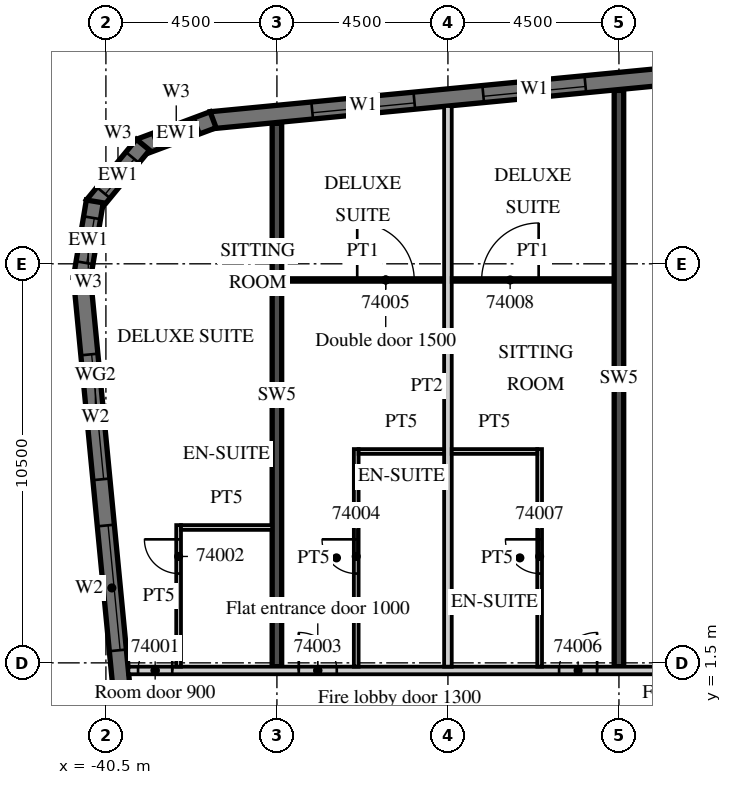
"""IFC4 building model, lengths in metres.
Left out: names, types, materials, properties, quantities, classifications, styles, units other than length and angle.
Written with IfcOpenShell. Run it as: python <this file> out.ifc"""

import sys

from ifc_helpers import new_model, si_unit, direction, frame, frame_2d, origin, place, context, subcontext, project, spatial, polyline, rectangle, outline, extrude, element, fill, save


model = new_model("IFC4")
c1 = context("Model", 3, precision=1e-05, world=origin(), true_north=direction((0.0, 1.0)))
c2 = subcontext(c1, "Body", "Model", "MODEL_VIEW")
j1 = project(units=[si_unit("LENGTHUNIT", "METRE"), si_unit("PLANEANGLEUNIT", "RADIAN")], contexts=[c1])
p1 = place(None, origin())
s1 = spatial("IfcSite", under=j1, at=p1, CompositionType="ELEMENT")
p2 = place(p1, origin())
s2 = spatial("IfcBuilding", under=s1, at=p2, CompositionType="ELEMENT")
p3 = place(p2, frame((0.0, 0.0, 294.9)))
s3 = spatial("IfcBuildingStorey", under=s2, at=p3, CompositionType="ELEMENT", Elevation=294.9)
p4 = place(p3, frame((-36.0, 1.4, 0.0), z_axis=(0.0, 0.0, 1.0), x_axis=(0.0, 1.0, 0.0)))
e1 = element("IfcWall", 1, at=p4, inside=s3, PredefinedType="SHEAR", context=c2, shape_type="SweptSolid", body=[
    extrude(rectangle(XDim=14.296, YDim=0.25, at=frame_2d((7.148, 0.0))), origin(), (0.0, 0.0, 1.0), 3.3),
])
p5 = place(p3, frame((-27.0, 1.4, 0.0), z_axis=(0.0, 0.0, 1.0), x_axis=(0.0, 1.0, 0.0)))
e2 = element("IfcWall", 2, at=p5, inside=s3, PredefinedType="SHEAR", context=c2, shape_type="SweptSolid", body=[
    extrude(rectangle(XDim=15.163, YDim=0.25, at=frame_2d((7.582, 0.0))), origin(), (0.0, 0.0, 1.0), 3.3),
])
p6 = place(p3, frame((-41.132, 11.658, 0.0), z_axis=(0.0, 0.0, 1.0), x_axis=(0.095847749461, -0.995396006082, 0.0)))
e3 = element("IfcWall", 3, at=p6, inside=s3, PredefinedType="SOLIDWALL", context=c2, shape_type="SweptSolid", body=[
    extrude(rectangle(XDim=32.0, YDim=0.45, at=frame_2d((16.0, 0.0))), origin(), (0.0, 0.0, 1.0), 3.02),
])
p7 = place(p6, frame((2.053, 0.0, 0.45)))
e4 = element("IfcOpeningElement", 4, at=p7, cuts=e3, PredefinedType="OPENING", context=c2, shape_type="SweptSolid", body=[
    extrude(rectangle(XDim=3.3, YDim=2.25, at=frame_2d((1.65, 1.125))), frame((0.0, 0.235, 0.0), z_axis=(0.0, -1.0, 0.0), x_axis=(1.0, 0.0, 0.0)), (0.0, 0.0, 1.0), 0.47),
])
p8 = place(p6, frame((6.574, 0.0, 0.45)))
e5 = element("IfcOpeningElement", 5, at=p8, cuts=e3, PredefinedType="OPENING", context=c2, shape_type="SweptSolid", body=[
    extrude(rectangle(XDim=3.3, YDim=2.25, at=frame_2d((1.65, 1.125))), frame((0.0, 0.235, 0.0), z_axis=(0.0, -1.0, 0.0), x_axis=(1.0, 0.0, 0.0)), (0.0, 0.0, 1.0), 0.47),
])
p9 = place(p3, frame((13.521, 20.713, 0.0), z_axis=(0.0, 0.0, 1.0), x_axis=(-0.995396277313, -0.095844932638, 0.0)))
e6 = element("IfcWall", 6, at=p9, inside=s3, PredefinedType="SOLIDWALL", context=c2, shape_type="SweptSolid", body=[
    extrude(rectangle(XDim=51.495, YDim=0.45, at=frame_2d((25.748, 0.0))), origin(), (0.0, 0.0, 1.0), 3.02),
])
p10 = place(p9, frame((0.91, 0.0, 0.45)))
e7 = element("IfcOpeningElement", 7, at=p10, cuts=e6, PredefinedType="OPENING", context=c2, shape_type="SweptSolid", body=[
    extrude(rectangle(XDim=2.7, YDim=2.25, at=frame_2d((1.35, 1.125))), frame((0.0, 0.235, 0.0), z_axis=(0.0, -1.0, 0.0), x_axis=(1.0, 0.0, 0.0)), (0.0, 0.0, 1.0), 0.47),
])
p11 = place(p9, frame((5.431, 0.0, 0.45)))
e8 = element("IfcOpeningElement", 8, at=p11, cuts=e6, PredefinedType="OPENING", context=c2, shape_type="SweptSolid", body=[
    extrude(rectangle(XDim=2.7, YDim=2.25, at=frame_2d((1.35, 1.125))), frame((0.0, 0.235, 0.0), z_axis=(0.0, -1.0, 0.0), x_axis=(1.0, 0.0, 0.0)), (0.0, 0.0, 1.0), 0.47),
])
p12 = place(p9, frame((9.952, 0.0, 0.45)))
e9 = element("IfcOpeningElement", 9, at=p12, cuts=e6, PredefinedType="OPENING", context=c2, shape_type="SweptSolid", body=[
    extrude(rectangle(XDim=2.7, YDim=2.25, at=frame_2d((1.35, 1.125))), frame((0.0, 0.235, 0.0), z_axis=(0.0, -1.0, 0.0), x_axis=(1.0, 0.0, 0.0)), (0.0, 0.0, 1.0), 0.47),
])
p13 = place(p9, frame((14.473, 0.0, 0.45)))
e10 = element("IfcOpeningElement", 10, at=p13, cuts=e6, PredefinedType="OPENING", context=c2, shape_type="SweptSolid", body=[
    extrude(rectangle(XDim=2.7, YDim=2.25, at=frame_2d((1.35, 1.125))), frame((0.0, 0.235, 0.0), z_axis=(0.0, -1.0, 0.0), x_axis=(1.0, 0.0, 0.0)), (0.0, 0.0, 1.0), 0.47),
])
p14 = place(p9, frame((18.994, 0.0, 0.45)))
e11 = element("IfcOpeningElement", 11, at=p14, cuts=e6, PredefinedType="OPENING", context=c2, shape_type="SweptSolid", body=[
    extrude(rectangle(XDim=2.7, YDim=2.25, at=frame_2d((1.35, 1.125))), frame((0.0, 0.235, 0.0), z_axis=(0.0, -1.0, 0.0), x_axis=(1.0, 0.0, 0.0)), (0.0, 0.0, 1.0), 0.47),
])
p15 = place(p9, frame((23.514, 0.0, 0.45)))
e12 = element("IfcOpeningElement", 12, at=p15, cuts=e6, PredefinedType="OPENING", context=c2, shape_type="SweptSolid", body=[
    extrude(rectangle(XDim=2.7, YDim=2.25, at=frame_2d((1.35, 1.125))), frame((0.0, 0.235, 0.0), z_axis=(0.0, -1.0, 0.0), x_axis=(1.0, 0.0, 0.0)), (0.0, 0.0, 1.0), 0.47),
])
p16 = place(p9, frame((28.035, 0.0, 0.45)))
e13 = element("IfcOpeningElement", 13, at=p16, cuts=e6, PredefinedType="OPENING", context=c2, shape_type="SweptSolid", body=[
    extrude(rectangle(XDim=2.7, YDim=2.25, at=frame_2d((1.35, 1.125))), frame((0.0, 0.235, 0.0), z_axis=(0.0, -1.0, 0.0), x_axis=(1.0, 0.0, 0.0)), (0.0, 0.0, 1.0), 0.47),
])
p17 = place(p9, frame((32.556, 0.0, 0.45)))
e14 = element("IfcOpeningElement", 14, at=p17, cuts=e6, PredefinedType="OPENING", context=c2, shape_type="SweptSolid", body=[
    extrude(rectangle(XDim=2.7, YDim=2.25, at=frame_2d((1.35, 1.125))), frame((0.0, 0.235, 0.0), z_axis=(0.0, -1.0, 0.0), x_axis=(1.0, 0.0, 0.0)), (0.0, 0.0, 1.0), 0.47),
])
p18 = place(p9, frame((37.077, 0.0, 0.45)))
e15 = element("IfcOpeningElement", 15, at=p18, cuts=e6, PredefinedType="OPENING", context=c2, shape_type="SweptSolid", body=[
    extrude(rectangle(XDim=2.7, YDim=2.25, at=frame_2d((1.35, 1.125))), frame((0.0, 0.235, 0.0), z_axis=(0.0, -1.0, 0.0), x_axis=(1.0, 0.0, 0.0)), (0.0, 0.0, 1.0), 0.47),
])
p19 = place(p9, frame((41.598, 0.0, 0.45)))
e16 = element("IfcOpeningElement", 16, at=p19, cuts=e6, PredefinedType="OPENING", context=c2, shape_type="SweptSolid", body=[
    extrude(rectangle(XDim=2.7, YDim=2.25, at=frame_2d((1.35, 1.125))), frame((0.0, 0.235, 0.0), z_axis=(0.0, -1.0, 0.0), x_axis=(1.0, 0.0, 0.0)), (0.0, 0.0, 1.0), 0.47),
])
p20 = place(p9, frame((46.118, 0.0, 0.45)))
e17 = element("IfcOpeningElement", 17, at=p20, cuts=e6, PredefinedType="OPENING", context=c2, shape_type="SweptSolid", body=[
    extrude(rectangle(XDim=2.7, YDim=2.25, at=frame_2d((1.35, 1.125))), frame((0.0, 0.235, 0.0), z_axis=(0.0, -1.0, 0.0), x_axis=(1.0, 0.0, 0.0)), (0.0, 0.0, 1.0), 0.47),
])
p21 = place(p3, frame((-37.679, 15.791, 0.0), z_axis=(0.0, 0.0, 1.0), x_axis=(-0.936677599948, -0.350192909346, 0.0)))
e18 = element("IfcWall", 18, at=p21, inside=s3, PredefinedType="SOLIDWALL", context=c2, shape_type="SweptSolid", body=[
    extrude(outline(polyline([(0.0, -0.225), (2.071, -0.225), (1.95, 0.225), (0.121, 0.225), (0.0, -0.225)])), origin(), (0.0, 0.0, 1.0), 3.02),
])
p22 = place(p21, frame((0.435, 0.0, 0.45)))
e19 = element("IfcOpeningElement", 19, at=p22, cuts=e18, PredefinedType="OPENING", context=c2, shape_type="SweptSolid", body=[
    extrude(rectangle(XDim=1.2, YDim=2.25, at=frame_2d((0.6, 1.125))), frame((0.0, 0.235, 0.0), z_axis=(0.0, -1.0, 0.0), x_axis=(1.0, 0.0, 0.0)), (0.0, 0.0, 1.0), 0.47),
])
p23 = place(p3, frame((-39.524, 15.133, 0.0), z_axis=(0.0, 0.0, 1.0), x_axis=(-0.636046112757, -0.771651049663, 0.0)))
e20 = element("IfcWall", 20, at=p23, inside=s3, PredefinedType="SOLIDWALL", context=c2, shape_type="SweptSolid", body=[
    extrude(outline(polyline([(0.0, -0.225), (2.071, -0.225), (1.95, 0.225), (0.121, 0.225), (0.0, -0.225)])), origin(), (0.0, 0.0, 1.0), 3.02),
])
p24 = place(p23, frame((0.435, 0.0, 0.45)))
e21 = element("IfcOpeningElement", 21, at=p24, cuts=e20, PredefinedType="OPENING", context=c2, shape_type="SweptSolid", body=[
    extrude(rectangle(XDim=1.2, YDim=2.25, at=frame_2d((0.6, 1.125))), frame((0.0, 0.235, 0.0), z_axis=(0.0, -1.0, 0.0), x_axis=(1.0, 0.0, 0.0)), (0.0, 0.0, 1.0), 0.47),
])
p25 = place(p3, frame((-40.792, 13.641, 0.0), z_axis=(0.0, 0.0, 1.0), x_axis=(-0.165068144653, -0.986282164302, 0.0)))
e22 = element("IfcWall", 22, at=p25, inside=s3, PredefinedType="SOLIDWALL", context=c2, shape_type="SweptSolid", body=[
    extrude(outline(polyline([(0.0, -0.225), (2.071, -0.225), (1.95, 0.225), (0.121, 0.225), (0.0, -0.225)])), origin(), (0.0, 0.0, 1.0), 3.02),
])
p26 = place(p25, frame((0.435, 0.0, 0.45)))
e23 = element("IfcOpeningElement", 23, at=p26, cuts=e22, PredefinedType="OPENING", context=c2, shape_type="SweptSolid", body=[
    extrude(rectangle(XDim=1.2, YDim=2.25, at=frame_2d((0.6, 1.125))), frame((0.0, 0.235, 0.0), z_axis=(0.0, -1.0, 0.0), x_axis=(1.0, 0.0, 0.0)), (0.0, 0.0, 1.0), 0.47),
])
p27 = place(p3, frame((-39.909, 1.3, 0.0), z_axis=(0.0, 0.0, 1.0), x_axis=(1.0, 0.0, 0.0)))
e24 = element("IfcWall", 24, at=p27, inside=s3, PredefinedType="PARTITIONING", context=c2, shape_type="SweptSolid", body=[
    extrude(rectangle(XDim=53.409, YDim=0.2, at=frame_2d((26.705, 0.0))), origin(), (0.0, 0.0, 1.0), 3.02),
])
p28 = place(p27, frame((0.255, 0.0, 0.0)))
e25 = element("IfcOpeningElement", 25, at=p28, cuts=e24, PredefinedType="OPENING", context=c2, shape_type="SweptSolid", body=[
    extrude(rectangle(XDim=0.9, YDim=2.1, at=frame_2d((0.45, 1.05))), frame((0.0, 0.11, 0.0), z_axis=(0.0, -1.0, 0.0), x_axis=(1.0, 0.0, 0.0)), (0.0, 0.0, 1.0), 0.22),
])
p29 = place(p27, frame((4.484, 0.0, 0.0)))
e26 = element("IfcOpeningElement", 26, at=p29, cuts=e24, PredefinedType="OPENING", context=c2, shape_type="SweptSolid", body=[
    extrude(rectangle(XDim=1.0, YDim=2.1, at=frame_2d((0.5, 1.05))), frame((0.0, 0.11, 0.0), z_axis=(0.0, -1.0, 0.0), x_axis=(1.0, 0.0, 0.0)), (0.0, 0.0, 1.0), 0.22),
])
p30 = place(p27, frame((11.334, 0.0, 0.0)))
e27 = element("IfcOpeningElement", 27, at=p30, cuts=e24, PredefinedType="OPENING", context=c2, shape_type="SweptSolid", body=[
    extrude(rectangle(XDim=1.0, YDim=2.1, at=frame_2d((0.5, 1.05))), frame((0.0, 0.11, 0.0), z_axis=(0.0, -1.0, 0.0), x_axis=(1.0, 0.0, 0.0)), (0.0, 0.0, 1.0), 0.22),
])
p31 = place(p27, frame((15.347, 0.0, 0.0)))
e28 = element("IfcOpeningElement", 28, at=p31, cuts=e24, PredefinedType="OPENING", context=c2, shape_type="SweptSolid", body=[
    extrude(rectangle(XDim=1.2, YDim=2.1, at=frame_2d((0.6, 1.05))), frame((0.0, 0.11, 0.0), z_axis=(0.0, -1.0, 0.0), x_axis=(1.0, 0.0, 0.0)), (0.0, 0.0, 1.0), 0.22),
])
p32 = place(p27, frame((24.859, 0.0, 0.0)))
e29 = element("IfcOpeningElement", 29, at=p32, cuts=e24, PredefinedType="OPENING", context=c2, shape_type="SweptSolid", body=[
    extrude(rectangle(XDim=1.0, YDim=2.1, at=frame_2d((0.5, 1.05))), frame((0.0, 0.11, 0.0), z_axis=(0.0, -1.0, 0.0), x_axis=(1.0, 0.0, 0.0)), (0.0, 0.0, 1.0), 0.22),
])
p33 = place(p27, frame((26.959, 0.0, 0.0)))
e30 = element("IfcOpeningElement", 30, at=p33, cuts=e24, PredefinedType="OPENING", context=c2, shape_type="SweptSolid", body=[
    extrude(rectangle(XDim=1.0, YDim=2.1, at=frame_2d((0.5, 1.05))), frame((0.0, 0.11, 0.0), z_axis=(0.0, -1.0, 0.0), x_axis=(1.0, 0.0, 0.0)), (0.0, 0.0, 1.0), 0.22),
])
p34 = place(p27, frame((33.346, 0.0, 0.0)))
e31 = element("IfcOpeningElement", 31, at=p34, cuts=e24, PredefinedType="OPENING", context=c2, shape_type="SweptSolid", body=[
    extrude(rectangle(XDim=1.2, YDim=2.1, at=frame_2d((0.6, 1.05))), frame((0.0, 0.11, 0.0), z_axis=(0.0, -1.0, 0.0), x_axis=(1.0, 0.0, 0.0)), (0.0, 0.0, 1.0), 0.22),
])
p35 = place(p27, frame((42.859, 0.0, 0.0)))
e32 = element("IfcOpeningElement", 32, at=p35, cuts=e24, PredefinedType="OPENING", context=c2, shape_type="SweptSolid", body=[
    extrude(rectangle(XDim=1.0, YDim=2.1, at=frame_2d((0.5, 1.05))), frame((0.0, 0.11, 0.0), z_axis=(0.0, -1.0, 0.0), x_axis=(1.0, 0.0, 0.0)), (0.0, 0.0, 1.0), 0.22),
])
p36 = place(p27, frame((44.959, 0.0, 0.0)))
e33 = element("IfcOpeningElement", 33, at=p36, cuts=e24, PredefinedType="OPENING", context=c2, shape_type="SweptSolid", body=[
    extrude(rectangle(XDim=1.0, YDim=2.1, at=frame_2d((0.5, 1.05))), frame((0.0, 0.11, 0.0), z_axis=(0.0, -1.0, 0.0), x_axis=(1.0, 0.0, 0.0)), (0.0, 0.0, 1.0), 0.22),
])
p37 = place(p27, frame((49.484, 0.0, 0.0)))
e34 = element("IfcOpeningElement", 34, at=p37, cuts=e24, PredefinedType="OPENING", context=c2, shape_type="SweptSolid", body=[
    extrude(rectangle(XDim=1.0, YDim=2.1, at=frame_2d((0.5, 1.05))), frame((0.0, 0.11, 0.0), z_axis=(0.0, -1.0, 0.0), x_axis=(1.0, 0.0, 0.0)), (0.0, 0.0, 1.0), 0.22),
])
p38 = place(p3, frame((-38.587, 1.4, 0.0), z_axis=(0.0, 0.0, 1.0), x_axis=(0.0, 1.0, 0.0)))
e35 = element("IfcWall", 35, at=p38, inside=s3, PredefinedType="PARTITIONING", context=c2, shape_type="SweptSolid", body=[
    extrude(rectangle(XDim=3.725, YDim=0.125, at=frame_2d((1.863, 0.0))), origin(), (0.0, 0.0, 1.0), 3.02),
])
p39 = place(p38, frame((2.45, 0.0, 0.0)))
e36 = element("IfcOpeningElement", 36, at=p39, cuts=e35, PredefinedType="OPENING", context=c2, shape_type="SweptSolid", body=[
    extrude(rectangle(XDim=0.9, YDim=2.1, at=frame_2d((0.45, 1.05))), frame((0.0, 0.073, 0.0), z_axis=(0.0, -1.0, 0.0), x_axis=(1.0, 0.0, 0.0)), (0.0, 0.0, 1.0), 0.145),
])
p40 = place(p3, frame((-38.525, 5.062, 0.0), z_axis=(0.0, 0.0, 1.0), x_axis=(1.0, 0.0, 0.0)))
e37 = element("IfcWall", 37, at=p40, inside=s3, PredefinedType="PARTITIONING", context=c2, shape_type="SweptSolid", body=[
    extrude(rectangle(XDim=2.4, YDim=0.125, at=frame_2d((1.2, 0.0))), origin(), (0.0, 0.0, 1.0), 3.02),
])
p41 = place(p3, frame((-31.5, 1.4, 0.0), z_axis=(0.0, 0.0, 1.0), x_axis=(0.0, 1.0, 0.0)))
e38 = element("IfcWall", 38, at=p41, inside=s3, PredefinedType="PARTITIONING", context=c2, shape_type="SweptSolid", body=[
    extrude(rectangle(XDim=14.752, YDim=0.2, at=frame_2d((7.376, 0.0))), origin(), (0.0, 0.0, 1.0), 3.02),
])
p42 = place(p3, frame((-33.913, 1.4, 0.0), z_axis=(0.0, 0.0, 1.0), x_axis=(0.0, 1.0, 0.0)))
e39 = element("IfcWall", 39, at=p42, inside=s3, PredefinedType="PARTITIONING", context=c2, shape_type="SweptSolid", body=[
    extrude(rectangle(XDim=5.725, YDim=0.125, at=frame_2d((2.863, 0.0))), origin(), (0.0, 0.0, 1.0), 3.02),
])
p43 = place(p42, frame((2.45, 0.0, 0.0)))
e40 = element("IfcOpeningElement", 40, at=p43, cuts=e39, PredefinedType="OPENING", context=c2, shape_type="SweptSolid", body=[
    extrude(rectangle(XDim=0.9, YDim=2.1, at=frame_2d((0.45, 1.05))), frame((0.0, 0.073, 0.0), z_axis=(0.0, -1.0, 0.0), x_axis=(1.0, 0.0, 0.0)), (0.0, 0.0, 1.0), 0.145),
])
p44 = place(p3, frame((-33.85, 7.062, 0.0), z_axis=(0.0, 0.0, 1.0), x_axis=(1.0, 0.0, 0.0)))
e41 = element("IfcWall", 41, at=p44, inside=s3, PredefinedType="PARTITIONING", context=c2, shape_type="SweptSolid", body=[
    extrude(rectangle(XDim=2.25, YDim=0.125, at=frame_2d((1.125, 0.0))), origin(), (0.0, 0.0, 1.0), 3.02),
])
p45 = place(p3, frame((-35.875, 11.575, 0.0), z_axis=(0.0, 0.0, 1.0), x_axis=(1.0, 0.0, 0.0)))
e42 = element("IfcWall", 42, at=p45, inside=s3, PredefinedType="PARTITIONING", context=c2, shape_type="SweptSolid", body=[
    extrude(rectangle(XDim=4.275, YDim=0.1, at=frame_2d((2.137, 0.0))), origin(), (0.0, 0.0, 1.0), 3.02),
])
p46 = place(p45, frame((1.988, 0.0, 0.0)))
e43 = element("IfcOpeningElement", 43, at=p46, cuts=e42, PredefinedType="OPENING", context=c2, shape_type="SweptSolid", body=[
    extrude(rectangle(XDim=1.5, YDim=2.1, at=frame_2d((0.75, 1.05))), frame((0.0, 0.06, 0.0), z_axis=(0.0, -1.0, 0.0), x_axis=(1.0, 0.0, 0.0)), (0.0, 0.0, 1.0), 0.12),
])
p47 = place(p3, frame((-29.087, 1.4, 0.0), z_axis=(0.0, 0.0, 1.0), x_axis=(0.0, 1.0, 0.0)))
e44 = element("IfcWall", 44, at=p47, inside=s3, PredefinedType="PARTITIONING", context=c2, shape_type="SweptSolid", body=[
    extrude(rectangle(XDim=5.725, YDim=0.125, at=frame_2d((2.863, 0.0))), origin(), (0.0, 0.0, 1.0), 3.02),
])
p48 = place(p47, frame((2.45, 0.0, 0.0)))
e45 = element("IfcOpeningElement", 45, at=p48, cuts=e44, PredefinedType="OPENING", context=c2, shape_type="SweptSolid", body=[
    extrude(rectangle(XDim=0.9, YDim=2.1, at=frame_2d((0.45, 1.05))), frame((0.0, 0.073, 0.0), z_axis=(0.0, -1.0, 0.0), x_axis=(1.0, 0.0, 0.0)), (0.0, 0.0, 1.0), 0.145),
])
p49 = place(p3, frame((-31.4, 7.062, 0.0), z_axis=(0.0, 0.0, 1.0), x_axis=(1.0, 0.0, 0.0)))
e46 = element("IfcWall", 46, at=p49, inside=s3, PredefinedType="PARTITIONING", context=c2, shape_type="SweptSolid", body=[
    extrude(rectangle(XDim=2.25, YDim=0.125, at=frame_2d((1.125, 0.0))), origin(), (0.0, 0.0, 1.0), 3.02),
])
p50 = place(p3, frame((-31.4, 11.575, 0.0), z_axis=(0.0, 0.0, 1.0), x_axis=(1.0, 0.0, 0.0)))
e47 = element("IfcWall", 47, at=p50, inside=s3, PredefinedType="PARTITIONING", context=c2, shape_type="SweptSolid", body=[
    extrude(rectangle(XDim=4.275, YDim=0.1, at=frame_2d((2.137, 0.0))), origin(), (0.0, 0.0, 1.0), 3.02),
])
p51 = place(p50, frame((0.787, 0.0, 0.0)))
e48 = element("IfcOpeningElement", 48, at=p51, cuts=e47, PredefinedType="OPENING", context=c2, shape_type="SweptSolid", body=[
    extrude(rectangle(XDim=1.5, YDim=2.1, at=frame_2d((0.75, 1.05))), frame((0.0, 0.06, 0.0), z_axis=(0.0, -1.0, 0.0), x_axis=(1.0, 0.0, 0.0)), (0.0, 0.0, 1.0), 0.12),
])
p52 = place(p7, origin())
e49 = element("IfcWindow", 49, at=p52, inside=s3, PartitioningType="SINGLE_PANEL", PredefinedType="WINDOW", context=c2, shape_type="SweptSolid", body=[
    extrude(rectangle(XDim=3.3, YDim=2.25, at=frame_2d((1.65, 1.125))), frame((0.0, 0.09, 0.0), z_axis=(0.0, -1.0, 0.0), x_axis=(1.0, 0.0, 0.0)), (0.0, 0.0, 1.0), 0.06),
])
fill(e4, e49)
p53 = place(p8, origin())
e50 = element("IfcWindow", 50, at=p53, inside=s3, PartitioningType="SINGLE_PANEL", PredefinedType="WINDOW", context=c2, shape_type="SweptSolid", body=[
    extrude(rectangle(XDim=3.3, YDim=2.25, at=frame_2d((1.65, 1.125))), frame((0.0, 0.09, 0.0), z_axis=(0.0, -1.0, 0.0), x_axis=(1.0, 0.0, 0.0)), (0.0, 0.0, 1.0), 0.06),
])
fill(e5, e50)
p54 = place(p19, origin())
e51 = element("IfcWindow", 51, at=p54, inside=s3, PartitioningType="SINGLE_PANEL", PredefinedType="WINDOW", context=c2, shape_type="SweptSolid", body=[
    extrude(rectangle(XDim=2.7, YDim=2.25, at=frame_2d((1.35, 1.125))), frame((0.0, 0.09, 0.0), z_axis=(0.0, -1.0, 0.0), x_axis=(1.0, 0.0, 0.0)), (0.0, 0.0, 1.0), 0.06),
])
fill(e16, e51)
p55 = place(p20, origin())
e52 = element("IfcWindow", 52, at=p55, inside=s3, PartitioningType="SINGLE_PANEL", PredefinedType="WINDOW", context=c2, shape_type="SweptSolid", body=[
    extrude(rectangle(XDim=2.7, YDim=2.25, at=frame_2d((1.35, 1.125))), frame((0.0, 0.09, 0.0), z_axis=(0.0, -1.0, 0.0), x_axis=(1.0, 0.0, 0.0)), (0.0, 0.0, 1.0), 0.06),
])
fill(e17, e52)
p56 = place(p22, origin())
e53 = element("IfcWindow", 53, at=p56, inside=s3, PartitioningType="SINGLE_PANEL", PredefinedType="WINDOW", context=c2, shape_type="SweptSolid", body=[
    extrude(rectangle(XDim=1.2, YDim=2.25, at=frame_2d((0.6, 1.125))), frame((0.0, 0.09, 0.0), z_axis=(0.0, -1.0, 0.0), x_axis=(1.0, 0.0, 0.0)), (0.0, 0.0, 1.0), 0.06),
])
fill(e19, e53)
p57 = place(p24, origin())
e54 = element("IfcWindow", 54, at=p57, inside=s3, PartitioningType="SINGLE_PANEL", PredefinedType="WINDOW", context=c2, shape_type="SweptSolid", body=[
    extrude(rectangle(XDim=1.2, YDim=2.25, at=frame_2d((0.6, 1.125))), frame((0.0, 0.09, 0.0), z_axis=(0.0, -1.0, 0.0), x_axis=(1.0, 0.0, 0.0)), (0.0, 0.0, 1.0), 0.06),
])
fill(e21, e54)
p58 = place(p26, origin())
e55 = element("IfcWindow", 55, at=p58, inside=s3, PartitioningType="SINGLE_PANEL", PredefinedType="WINDOW", context=c2, shape_type="SweptSolid", body=[
    extrude(rectangle(XDim=1.2, YDim=2.25, at=frame_2d((0.6, 1.125))), frame((0.0, 0.09, 0.0), z_axis=(0.0, -1.0, 0.0), x_axis=(1.0, 0.0, 0.0)), (0.0, 0.0, 1.0), 0.06),
])
fill(e23, e55)
p59 = place(p28, origin())
e56 = element("IfcDoor", 56, at=p59, inside=s3, OperationType="SINGLE_SWING_RIGHT", PredefinedType="DOOR", context=c2, shape_type="SweptSolid", body=[
    extrude(rectangle(XDim=0.9, YDim=2.1, at=frame_2d((0.45, 1.05))), frame((0.0, 0.025, 0.0), z_axis=(0.0, -1.0, 0.0), x_axis=(1.0, 0.0, 0.0)), (0.0, 0.0, 1.0), 0.05),
])
fill(e25, e56)
p60 = place(p39, origin())
e57 = element("IfcDoor", 57, at=p60, inside=s3, OperationType="SINGLE_SWING_RIGHT", PredefinedType="DOOR", context=c2, shape_type="SweptSolid", body=[
    extrude(rectangle(XDim=0.9, YDim=2.1, at=frame_2d((0.45, 1.05))), frame((0.0, 0.025, 0.0), z_axis=(0.0, -1.0, 0.0), x_axis=(1.0, 0.0, 0.0)), (0.0, 0.0, 1.0), 0.05),
])
fill(e36, e57)
p61 = place(p29, origin())
e58 = element("IfcDoor", 58, at=p61, inside=s3, OperationType="SINGLE_SWING_LEFT", PredefinedType="DOOR", context=c2, shape_type="SweptSolid", body=[
    extrude(rectangle(XDim=1.0, YDim=2.1, at=frame_2d((0.5, 1.05))), frame((0.0, 0.025, 0.0), z_axis=(0.0, -1.0, 0.0), x_axis=(1.0, 0.0, 0.0)), (0.0, 0.0, 1.0), 0.05),
])
fill(e26, e58)
p62 = place(p43, origin())
e59 = element("IfcDoor", 59, at=p62, inside=s3, OperationType="SINGLE_SWING_RIGHT", PredefinedType="DOOR", context=c2, shape_type="SweptSolid", body=[
    extrude(rectangle(XDim=0.9, YDim=2.1, at=frame_2d((0.45, 1.05))), frame((0.0, 0.025, 0.0), z_axis=(0.0, -1.0, 0.0), x_axis=(1.0, 0.0, 0.0)), (0.0, 0.0, 1.0), 0.05),
])
fill(e40, e59)
p63 = place(p46, origin())
e60 = element("IfcDoor", 60, at=p63, inside=s3, OperationType="SINGLE_SWING_LEFT", PredefinedType="DOOR", context=c2, shape_type="SweptSolid", body=[
    extrude(rectangle(XDim=1.5, YDim=2.1, at=frame_2d((0.75, 1.05))), frame((0.0, 0.025, 0.0), z_axis=(0.0, -1.0, 0.0), x_axis=(1.0, 0.0, 0.0)), (0.0, 0.0, 1.0), 0.05),
])
fill(e43, e60)
p64 = place(p30, origin())
e61 = element("IfcDoor", 61, at=p64, inside=s3, OperationType="SINGLE_SWING_RIGHT", PredefinedType="DOOR", context=c2, shape_type="SweptSolid", body=[
    extrude(rectangle(XDim=1.0, YDim=2.1, at=frame_2d((0.5, 1.05))), frame((0.0, 0.025, 0.0), z_axis=(0.0, -1.0, 0.0), x_axis=(1.0, 0.0, 0.0)), (0.0, 0.0, 1.0), 0.05),
])
fill(e27, e61)
p65 = place(p48, origin())
e62 = element("IfcDoor", 62, at=p65, inside=s3, OperationType="SINGLE_SWING_RIGHT", PredefinedType="DOOR", context=c2, shape_type="SweptSolid", body=[
    extrude(rectangle(XDim=0.9, YDim=2.1, at=frame_2d((0.45, 1.05))), frame((0.0, 0.025, 0.0), z_axis=(0.0, -1.0, 0.0), x_axis=(1.0, 0.0, 0.0)), (0.0, 0.0, 1.0), 0.05),
])
fill(e45, e62)
p66 = place(p51, origin())
e63 = element("IfcDoor", 63, at=p66, inside=s3, OperationType="SINGLE_SWING_RIGHT", PredefinedType="DOOR", context=c2, shape_type="SweptSolid", body=[
    extrude(rectangle(XDim=1.5, YDim=2.1, at=frame_2d((0.75, 1.05))), frame((0.0, 0.025, 0.0), z_axis=(0.0, -1.0, 0.0), x_axis=(1.0, 0.0, 0.0)), (0.0, 0.0, 1.0), 0.05),
])
fill(e48, e63)
save(model, sys.argv[1])
